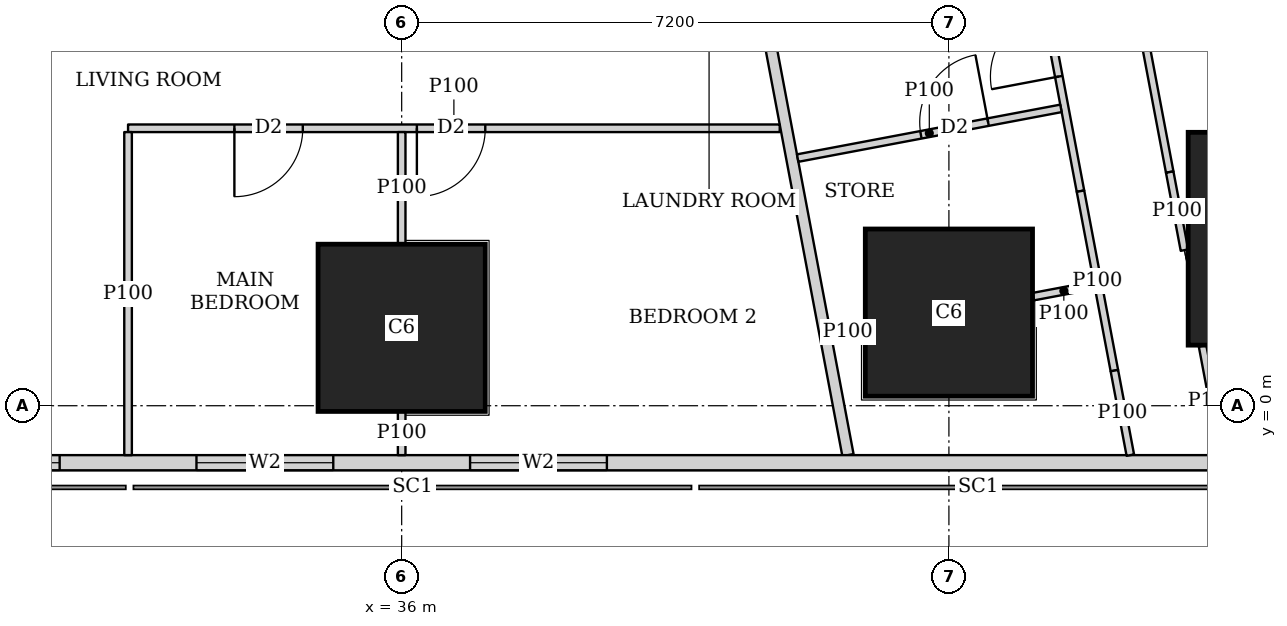
"""IFC4 building model, lengths in metres.
Left out: names, types, materials, properties, quantities, classifications, styles, units other than length and angle.
Written with IfcOpenShell. Run it as: python <this file> out.ifc"""

import sys

from ifc_helpers import new_model, si_unit, direction, frame, frame_2d, origin, origin_2d, place, context, subcontext, project, spatial, rectangle, extrude, element, fill, save


model = new_model("IFC4")
c1 = context("Model", 3, precision=1e-05, world=origin(), true_north=direction((0.0, 1.0)))
c2 = subcontext(c1, "Body", "Model", "MODEL_VIEW")
j1 = project(units=[si_unit("LENGTHUNIT", "METRE"), si_unit("PLANEANGLEUNIT", "RADIAN")], contexts=[c1])
p1 = place(None, origin())
s1 = spatial("IfcSite", under=j1, at=p1, CompositionType="ELEMENT")
p2 = place(p1, origin())
s2 = spatial("IfcBuilding", under=s1, at=p2, CompositionType="ELEMENT")
p3 = place(p2, frame((0.0, 0.0, 111.65)))
s3 = spatial("IfcBuildingStorey", under=s2, at=p3, CompositionType="ELEMENT", Elevation=111.65)
for number, where, z_axis, x_axis in (
    (1, (36.0, 1.025, 0.0), (0.0, 0.0, 1.0), (1.0, 0.0, 0.0)),
    (2, (43.2, 1.225, 0.0), (0.0, 0.0, 1.0), (1.0, 0.0, 0.0)),
):
    element("IfcColumn", number, at=place(p3, frame(where, z_axis=z_axis, x_axis=x_axis)), inside=s3, PredefinedType="COLUMN", context=c2, shape_type="SweptSolid", body=[
        extrude(rectangle(XDim=2.2, YDim=2.2, at=origin_2d()), origin(), (0.0, 0.0, 1.0), 3.75),
    ])
p4 = place(p3, frame((47.748, 2.197, 0.0), z_axis=(0.0, 0.0, 1.0), x_axis=(1.0, 0.0, 0.0)))
e3 = element("IfcColumn", 3, at=p4, inside=s3, PredefinedType="COLUMN", context=c2, shape_type="SweptSolid", body=[
    extrude(rectangle(XDim=2.8, YDim=2.8, at=origin_2d()), origin(), (0.0, 0.0, 1.0), 3.75),
])
p5 = place(p3, frame((2.163, -0.75, 0.0), z_axis=(0.0, 0.0, 1.0), x_axis=(1.0, 0.0, 0.0)))
e4 = element("IfcWall", 4, at=p5, inside=s3, PredefinedType="SOLIDWALL", context=c2, shape_type="SweptSolid", body=[
    extrude(rectangle(XDim=45.628, YDim=0.2, at=frame_2d((22.814, 0.0))), origin(), (0.0, 0.0, 1.0), 3.5),
])
p6 = place(p5, frame((9.537, 0.0, 0.9)))
e5 = element("IfcOpeningElement", 5, at=p6, cuts=e4, PredefinedType="OPENING", context=c2, shape_type="SweptSolid", body=[
    extrude(rectangle(XDim=1.8, YDim=1.5, at=frame_2d((0.9, 0.75))), frame((0.0, 0.11, 0.0), z_axis=(0.0, -1.0, 0.0), x_axis=(1.0, 0.0, 0.0)), (0.0, 0.0, 1.0), 0.22),
])
p7 = place(p5, frame((13.137, 0.0, 0.9)))
e6 = element("IfcOpeningElement", 6, at=p7, cuts=e4, PredefinedType="OPENING", context=c2, shape_type="SweptSolid", body=[
    extrude(rectangle(XDim=1.8, YDim=1.5, at=frame_2d((0.9, 0.75))), frame((0.0, 0.11, 0.0), z_axis=(0.0, -1.0, 0.0), x_axis=(1.0, 0.0, 0.0)), (0.0, 0.0, 1.0), 0.22),
])
p8 = place(p5, frame((16.737, 0.0, 0.9)))
e7 = element("IfcOpeningElement", 7, at=p8, cuts=e4, PredefinedType="OPENING", context=c2, shape_type="SweptSolid", body=[
    extrude(rectangle(XDim=1.8, YDim=1.5, at=frame_2d((0.9, 0.75))), frame((0.0, 0.11, 0.0), z_axis=(0.0, -1.0, 0.0), x_axis=(1.0, 0.0, 0.0)), (0.0, 0.0, 1.0), 0.22),
])
p9 = place(p5, frame((20.337, 0.0, 0.9)))
e8 = element("IfcOpeningElement", 8, at=p9, cuts=e4, PredefinedType="OPENING", context=c2, shape_type="SweptSolid", body=[
    extrude(rectangle(XDim=1.8, YDim=1.5, at=frame_2d((0.9, 0.75))), frame((0.0, 0.11, 0.0), z_axis=(0.0, -1.0, 0.0), x_axis=(1.0, 0.0, 0.0)), (0.0, 0.0, 1.0), 0.22),
])
p10 = place(p5, frame((23.937, 0.0, 0.9)))
e9 = element("IfcOpeningElement", 9, at=p10, cuts=e4, PredefinedType="OPENING", context=c2, shape_type="SweptSolid", body=[
    extrude(rectangle(XDim=1.8, YDim=1.5, at=frame_2d((0.9, 0.75))), frame((0.0, 0.11, 0.0), z_axis=(0.0, -1.0, 0.0), x_axis=(1.0, 0.0, 0.0)), (0.0, 0.0, 1.0), 0.22),
])
p11 = place(p5, frame((27.537, 0.0, 0.9)))
e10 = element("IfcOpeningElement", 10, at=p11, cuts=e4, PredefinedType="OPENING", context=c2, shape_type="SweptSolid", body=[
    extrude(rectangle(XDim=1.8, YDim=1.5, at=frame_2d((0.9, 0.75))), frame((0.0, 0.11, 0.0), z_axis=(0.0, -1.0, 0.0), x_axis=(1.0, 0.0, 0.0)), (0.0, 0.0, 1.0), 0.22),
])
p12 = place(p5, frame((31.137, 0.0, 0.9)))
e11 = element("IfcOpeningElement", 11, at=p12, cuts=e4, PredefinedType="OPENING", context=c2, shape_type="SweptSolid", body=[
    extrude(rectangle(XDim=1.8, YDim=1.5, at=frame_2d((0.9, 0.75))), frame((0.0, 0.11, 0.0), z_axis=(0.0, -1.0, 0.0), x_axis=(1.0, 0.0, 0.0)), (0.0, 0.0, 1.0), 0.22),
])
p13 = place(p5, frame((34.737, 0.0, 0.9)))
e12 = element("IfcOpeningElement", 12, at=p13, cuts=e4, PredefinedType="OPENING", context=c2, shape_type="SweptSolid", body=[
    extrude(rectangle(XDim=1.8, YDim=1.5, at=frame_2d((0.9, 0.75))), frame((0.0, 0.11, 0.0), z_axis=(0.0, -1.0, 0.0), x_axis=(1.0, 0.0, 0.0)), (0.0, 0.0, 1.0), 0.22),
])
p14 = place(p3, frame((50.653, 2.703, 0.0), z_axis=(0.0, 0.0, 1.0), x_axis=(-0.185612026696, 0.982623109613, 0.0)))
e13 = element("IfcWall", 13, at=p14, inside=s3, PredefinedType="SOLIDWALL", context=c2, shape_type="SweptSolid", body=[
    extrude(rectangle(XDim=41.393, YDim=0.2, at=frame_2d((20.697, 0.0))), origin(), (0.0, 0.0, 1.0), 3.5),
])
p15 = place(p14, frame((1.633, 0.0, 0.9)))
e14 = element("IfcOpeningElement", 14, at=p15, cuts=e13, PredefinedType="OPENING", context=c2, shape_type="SweptSolid", body=[
    extrude(rectangle(XDim=1.8, YDim=1.5, at=frame_2d((0.9, 0.75))), frame((0.0, 0.11, 0.0), z_axis=(0.0, -1.0, 0.0), x_axis=(1.0, 0.0, 0.0)), (0.0, 0.0, 1.0), 0.22),
])
p16 = place(p14, frame((6.032, 0.0, 0.9)))
e15 = element("IfcOpeningElement", 15, at=p16, cuts=e13, PredefinedType="OPENING", context=c2, shape_type="SweptSolid", body=[
    extrude(rectangle(XDim=1.8, YDim=1.5, at=frame_2d((0.9, 0.75))), frame((0.0, 0.11, 0.0), z_axis=(0.0, -1.0, 0.0), x_axis=(1.0, 0.0, 0.0)), (0.0, 0.0, 1.0), 0.22),
])
p17 = place(p14, frame((9.848, 0.0, 0.9)))
e16 = element("IfcOpeningElement", 16, at=p17, cuts=e13, PredefinedType="OPENING", context=c2, shape_type="SweptSolid", body=[
    extrude(rectangle(XDim=1.8, YDim=1.5, at=frame_2d((0.9, 0.75))), frame((0.0, 0.11, 0.0), z_axis=(0.0, -1.0, 0.0), x_axis=(1.0, 0.0, 0.0)), (0.0, 0.0, 1.0), 0.22),
])
p18 = place(p14, frame((13.664, 0.0, 0.9)))
e17 = element("IfcOpeningElement", 17, at=p18, cuts=e13, PredefinedType="OPENING", context=c2, shape_type="SweptSolid", body=[
    extrude(rectangle(XDim=1.8, YDim=1.5, at=frame_2d((0.9, 0.75))), frame((0.0, 0.11, 0.0), z_axis=(0.0, -1.0, 0.0), x_axis=(1.0, 0.0, 0.0)), (0.0, 0.0, 1.0), 0.22),
])
p19 = place(p14, frame((17.481, 0.0, 0.9)))
e18 = element("IfcOpeningElement", 18, at=p19, cuts=e13, PredefinedType="OPENING", context=c2, shape_type="SweptSolid", body=[
    extrude(rectangle(XDim=1.8, YDim=1.5, at=frame_2d((0.9, 0.75))), frame((0.0, 0.11, 0.0), z_axis=(0.0, -1.0, 0.0), x_axis=(1.0, 0.0, 0.0)), (0.0, 0.0, 1.0), 0.22),
])
p20 = place(p14, frame((21.297, 0.0, 0.9)))
e19 = element("IfcOpeningElement", 19, at=p20, cuts=e13, PredefinedType="OPENING", context=c2, shape_type="SweptSolid", body=[
    extrude(rectangle(XDim=1.8, YDim=1.5, at=frame_2d((0.9, 0.75))), frame((0.0, 0.11, 0.0), z_axis=(0.0, -1.0, 0.0), x_axis=(1.0, 0.0, 0.0)), (0.0, 0.0, 1.0), 0.22),
])
p21 = place(p14, frame((25.113, 0.0, 0.9)))
e20 = element("IfcOpeningElement", 20, at=p21, cuts=e13, PredefinedType="OPENING", context=c2, shape_type="SweptSolid", body=[
    extrude(rectangle(XDim=1.8, YDim=1.5, at=frame_2d((0.9, 0.75))), frame((0.0, 0.11, 0.0), z_axis=(0.0, -1.0, 0.0), x_axis=(1.0, 0.0, 0.0)), (0.0, 0.0, 1.0), 0.22),
])
p22 = place(p14, frame((28.93, 0.0, 0.9)))
e21 = element("IfcOpeningElement", 21, at=p22, cuts=e13, PredefinedType="OPENING", context=c2, shape_type="SweptSolid", body=[
    extrude(rectangle(XDim=1.8, YDim=1.5, at=frame_2d((0.9, 0.75))), frame((0.0, 0.11, 0.0), z_axis=(0.0, -1.0, 0.0), x_axis=(1.0, 0.0, 0.0)), (0.0, 0.0, 1.0), 0.22),
])
p23 = place(p14, frame((32.746, 0.0, 0.9)))
e22 = element("IfcOpeningElement", 22, at=p23, cuts=e13, PredefinedType="OPENING", context=c2, shape_type="SweptSolid", body=[
    extrude(rectangle(XDim=1.8, YDim=1.5, at=frame_2d((0.9, 0.75))), frame((0.0, 0.11, 0.0), z_axis=(0.0, -1.0, 0.0), x_axis=(1.0, 0.0, 0.0)), (0.0, 0.0, 1.0), 0.22),
])
p24 = place(p14, frame((36.481, 0.0, 0.9)))
e23 = element("IfcOpeningElement", 23, at=p24, cuts=e13, PredefinedType="OPENING", context=c2, shape_type="SweptSolid", body=[
    extrude(rectangle(XDim=1.8, YDim=1.5, at=frame_2d((0.9, 0.75))), frame((0.0, 0.11, 0.0), z_axis=(0.0, -1.0, 0.0), x_axis=(1.0, 0.0, 0.0)), (0.0, 0.0, 1.0), 0.22),
])
p25 = place(p3, frame((33.127, 45.65, 0.0), z_axis=(0.0, 0.0, 1.0), x_axis=(0.185598547723, -0.98262565562, 0.0)))
e24 = element("IfcWall", 24, at=p25, inside=s3, PredefinedType="SOLIDWALL", context=c2, shape_type="SweptSolid", body=[
    extrude(rectangle(XDim=47.118, YDim=0.15, at=frame_2d((23.559, 0.0))), origin(), (0.0, 0.0, 1.0), 2.2),
])
p26 = place(p25, frame((20.373, 0.0, 0.0)))
e25 = element("IfcOpeningElement", 25, at=p26, cuts=e24, PredefinedType="OPENING", context=c2, shape_type="SweptSolid", body=[
    extrude(rectangle(XDim=1.0, YDim=2.1, at=frame_2d((0.5, 1.05))), frame((0.0, 0.085, 0.0), z_axis=(0.0, -1.0, 0.0), x_axis=(1.0, 0.0, 0.0)), (0.0, 0.0, 1.0), 0.17),
])
p27 = place(p25, frame((24.188, 0.0, 0.0)))
e26 = element("IfcOpeningElement", 26, at=p27, cuts=e24, PredefinedType="OPENING", context=c2, shape_type="SweptSolid", body=[
    extrude(rectangle(XDim=1.0, YDim=2.1, at=frame_2d((0.5, 1.05))), frame((0.0, 0.085, 0.0), z_axis=(0.0, -1.0, 0.0), x_axis=(1.0, 0.0, 0.0)), (0.0, 0.0, 1.0), 0.17),
])
p28 = place(p25, frame((32.608, 0.0, 0.0)))
e27 = element("IfcOpeningElement", 27, at=p28, cuts=e24, PredefinedType="OPENING", context=c2, shape_type="SweptSolid", body=[
    extrude(rectangle(XDim=1.0, YDim=2.1, at=frame_2d((0.5, 1.05))), frame((0.0, 0.085, 0.0), z_axis=(0.0, -1.0, 0.0), x_axis=(1.0, 0.0, 0.0)), (0.0, 0.0, 1.0), 0.17),
])
p29 = place(p3, frame((40.974, 3.65, 0.0), z_axis=(0.0, 0.0, 1.0), x_axis=(-1.0, 0.0, 0.0)))
e28 = element("IfcWall", 28, at=p29, inside=s3, PredefinedType="PARTITIONING", context=c2, shape_type="SweptSolid", body=[
    extrude(rectangle(XDim=8.574, YDim=0.1, at=frame_2d((4.287, 0.0))), origin(), (0.0, 0.0, 1.0), 3.5),
])
p30 = place(p29, frame((6.275, 0.0, 0.0)))
e29 = element("IfcOpeningElement", 29, at=p30, cuts=e28, PredefinedType="OPENING", context=c2, shape_type="SweptSolid", body=[
    extrude(rectangle(XDim=0.9, YDim=2.1, at=frame_2d((0.45, 1.05))), frame((0.0, 0.06, 0.0), z_axis=(0.0, -1.0, 0.0), x_axis=(1.0, 0.0, 0.0)), (0.0, 0.0, 1.0), 0.12),
])
p31 = place(p29, frame((3.874, 0.0, 0.0)))
e30 = element("IfcOpeningElement", 30, at=p31, cuts=e28, PredefinedType="OPENING", context=c2, shape_type="SweptSolid", body=[
    extrude(rectangle(XDim=0.9, YDim=2.1, at=frame_2d((0.45, 1.05))), frame((0.0, 0.06, 0.0), z_axis=(0.0, -1.0, 0.0), x_axis=(1.0, 0.0, 0.0)), (0.0, 0.0, 1.0), 0.12),
])
p32 = place(p3, frame((32.4, -0.65, 0.0), z_axis=(0.0, 0.0, 1.0), x_axis=(0.0, 1.0, 0.0)))
e31 = element("IfcWall", 31, at=p32, inside=s3, PredefinedType="PARTITIONING", context=c2, shape_type="SweptSolid", body=[
    extrude(rectangle(XDim=4.25, YDim=0.1, at=frame_2d((2.125, 0.0))), origin(), (0.0, 0.0, 1.0), 2.2),
])
p33 = place(p3, frame((36.0, -0.65, 0.0), z_axis=(0.0, 0.0, 1.0), x_axis=(0.0, 1.0, 0.0)))
e32 = element("IfcWall", 32, at=p33, inside=s3, PredefinedType="PARTITIONING", context=c2, shape_type="SweptSolid", body=[
    extrude(rectangle(XDim=0.574, YDim=0.1, at=frame_2d((0.287, 0.0))), origin(), (0.0, 0.0, 1.0), 3.5),
])
p34 = place(p3, frame((36.0, 2.126, 0.0), z_axis=(0.0, 0.0, 1.0), x_axis=(0.0, 1.0, 0.0)))
e33 = element("IfcWall", 33, at=p34, inside=s3, PredefinedType="PARTITIONING", context=c2, shape_type="SweptSolid", body=[
    extrude(rectangle(XDim=1.474, YDim=0.1, at=frame_2d((0.737, 0.0))), origin(), (0.0, 0.0, 1.0), 3.5),
])
p35 = place(p3, frame((44.08, 13.794, 0.0), z_axis=(0.0, 0.0, 1.0), x_axis=(0.185608455357, -0.982623784212, 0.0)))
e34 = element("IfcWall", 34, at=p35, inside=s3, PredefinedType="PARTITIONING", context=c2, shape_type="SweptSolid", body=[
    extrude(rectangle(XDim=10.909, YDim=0.1, at=frame_2d((5.455, 0.0))), origin(), (0.0, 0.0, 1.0), 3.5),
])
p36 = place(p35, frame((1.094, 0.0, 0.0)))
e35 = element("IfcOpeningElement", 35, at=p36, cuts=e34, PredefinedType="OPENING", context=c2, shape_type="SweptSolid", body=[
    extrude(rectangle(XDim=0.9, YDim=2.1, at=frame_2d((0.45, 1.05))), frame((0.0, 0.06, 0.0), z_axis=(0.0, -1.0, 0.0), x_axis=(1.0, 0.0, 0.0)), (0.0, 0.0, 1.0), 0.12),
])
p37 = place(p35, frame((3.639, 0.0, 0.0)))
e36 = element("IfcOpeningElement", 36, at=p37, cuts=e34, PredefinedType="OPENING", context=c2, shape_type="SweptSolid", body=[
    extrude(rectangle(XDim=0.9, YDim=2.1, at=frame_2d((0.45, 1.05))), frame((0.0, 0.06, 0.0), z_axis=(0.0, -1.0, 0.0), x_axis=(1.0, 0.0, 0.0)), (0.0, 0.0, 1.0), 0.12),
])
p38 = place(p35, frame((8.05, 0.0, 0.0)))
e37 = element("IfcOpeningElement", 37, at=p38, cuts=e34, PredefinedType="OPENING", context=c2, shape_type="SweptSolid", body=[
    extrude(rectangle(XDim=0.9, YDim=2.1, at=frame_2d((0.45, 1.05))), frame((0.0, 0.06, 0.0), z_axis=(0.0, -1.0, 0.0), x_axis=(1.0, 0.0, 0.0)), (0.0, 0.0, 1.0), 0.12),
])
p39 = place(p3, frame((46.105, 3.074, 0.0), z_axis=(0.0, 0.0, 1.0), x_axis=(0.185727077805, -0.982601370124, 0.0)))
e38 = element("IfcWall", 38, at=p39, inside=s3, PredefinedType="PARTITIONING", context=c2, shape_type="SweptSolid", body=[
    extrude(rectangle(XDim=1.045, YDim=0.1, at=frame_2d((0.522, 0.0))), origin(), (0.0, 0.0, 1.0), 2.05),
])
p40 = place(p3, frame((46.537, 0.787, 0.0), z_axis=(0.0, 0.0, 1.0), x_axis=(0.1853166059, -0.982678866964, 0.0)))
e39 = element("IfcWall", 39, at=p40, inside=s3, PredefinedType="PARTITIONING", context=c2, shape_type="SweptSolid", body=[
    extrude(rectangle(XDim=1.462, YDim=0.1, at=frame_2d((0.731, 0.0))), origin(), (0.0, 0.0, 1.0), 2.05),
])
p41 = place(p3, frame((44.049, 7.491, 0.0), z_axis=(0.0, 0.0, 1.0), x_axis=(0.185628828844, -0.982619935632, 0.0)))
e40 = element("IfcWall", 40, at=p41, inside=s3, PredefinedType="PARTITIONING", context=c2, shape_type="SweptSolid", body=[
    extrude(rectangle(XDim=4.75, YDim=0.1, at=frame_2d((2.375, 0.0))), origin(), (0.0, 0.0, 1.0), 3.5),
])
p42 = place(p41, frame((0.8, 0.0, 0.0)))
e41 = element("IfcOpeningElement", 41, at=p42, cuts=e40, PredefinedType="OPENING", context=c2, shape_type="SweptSolid", body=[
    extrude(rectangle(XDim=0.9, YDim=2.1, at=frame_2d((0.45, 1.05))), frame((0.0, 0.06, 0.0), z_axis=(0.0, -1.0, 0.0), x_axis=(1.0, 0.0, 0.0)), (0.0, 0.0, 1.0), 0.12),
])
p43 = place(p41, frame((2.316, 0.0, 0.0)))
e42 = element("IfcOpeningElement", 42, at=p43, cuts=e40, PredefinedType="OPENING", context=c2, shape_type="SweptSolid", body=[
    extrude(rectangle(XDim=0.9, YDim=2.1, at=frame_2d((0.45, 1.05))), frame((0.0, 0.06, 0.0), z_axis=(0.0, -1.0, 0.0), x_axis=(1.0, 0.0, 0.0)), (0.0, 0.0, 1.0), 0.12),
])
p44 = place(p3, frame((44.931, 2.823, 0.0), z_axis=(0.0, 0.0, 1.0), x_axis=(0.185631845838, -0.982619365681, 0.0)))
e43 = element("IfcWall", 43, at=p44, inside=s3, PredefinedType="PARTITIONING", context=c2, shape_type="SweptSolid", body=[
    extrude(rectangle(XDim=2.403, YDim=0.1, at=frame_2d((1.201, 0.0))), origin(), (0.0, 0.0, 1.0), 2.05),
])
p45 = place(p3, frame((45.377, 0.462, 0.0), z_axis=(0.0, 0.0, 1.0), x_axis=(0.185565106588, -0.9826319714, 0.0)))
e44 = element("IfcWall", 44, at=p45, inside=s3, PredefinedType="PARTITIONING", context=c2, shape_type="SweptSolid", body=[
    extrude(rectangle(XDim=1.131, YDim=0.1, at=frame_2d((0.566, 0.0))), origin(), (0.0, 0.0, 1.0), 3.5),
])
p46 = place(p3, frame((45.114, 1.587, 0.0), z_axis=(0.0, 0.0, 1.0), x_axis=(-0.982624706348, -0.185603573443, 0.0)))
e45 = element("IfcWall", 45, at=p46, inside=s3, PredefinedType="PARTITIONING", context=c2, shape_type="SweptSolid", body=[
    extrude(rectangle(XDim=0.818, YDim=0.1, at=frame_2d((0.409, 0.0))), origin(), (0.0, 0.0, 1.0), 2.05),
])
p47 = place(p3, frame((42.09, 1.015, 0.0), z_axis=(0.0, 0.0, 1.0), x_axis=(-0.982680384557, -0.185308558375, 0.0)))
e46 = element("IfcWall", 46, at=p47, inside=s3, PredefinedType="PARTITIONING", context=c2, shape_type="SweptSolid", body=[
    extrude(rectangle(XDim=0.448, YDim=0.1, at=frame_2d((0.224, 0.0))), origin(), (0.0, 0.0, 1.0), 2.05),
])
p48 = place(p3, frame((41.21, 3.258, 0.0), z_axis=(0.0, 0.0, 1.0), x_axis=(0.982638553676, 0.185530247748, 0.0)))
e47 = element("IfcWall", 47, at=p48, inside=s3, PredefinedType="PARTITIONING", context=c2, shape_type="SweptSolid", body=[
    extrude(rectangle(XDim=3.525, YDim=0.1, at=frame_2d((1.763, 0.0))), origin(), (0.0, 0.0, 1.0), 3.5),
])
p49 = place(p48, frame((1.65, 0.0, 0.0)))
e48 = element("IfcOpeningElement", 48, at=p49, cuts=e47, PredefinedType="OPENING", context=c2, shape_type="SweptSolid", body=[
    extrude(rectangle(XDim=0.9, YDim=2.1, at=frame_2d((0.45, 1.05))), frame((0.0, 0.06, 0.0), z_axis=(0.0, -1.0, 0.0), x_axis=(1.0, 0.0, 0.0)), (0.0, 0.0, 1.0), 0.12),
])
p50 = place(p11, origin())
e49 = element("IfcWindow", 49, at=p50, inside=s3, PartitioningType="SINGLE_PANEL", PredefinedType="WINDOW", context=c2, shape_type="SweptSolid", body=[
    extrude(rectangle(XDim=1.8, YDim=1.5, at=frame_2d((0.9, 0.75))), frame((0.0, 0.03, 0.0), z_axis=(0.0, -1.0, 0.0), x_axis=(1.0, 0.0, 0.0)), (0.0, 0.0, 1.0), 0.06),
])
fill(e10, e49)
p51 = place(p12, origin())
e50 = element("IfcWindow", 50, at=p51, inside=s3, PartitioningType="SINGLE_PANEL", PredefinedType="WINDOW", context=c2, shape_type="SweptSolid", body=[
    extrude(rectangle(XDim=1.8, YDim=1.5, at=frame_2d((0.9, 0.75))), frame((0.0, 0.03, 0.0), z_axis=(0.0, -1.0, 0.0), x_axis=(1.0, 0.0, 0.0)), (0.0, 0.0, 1.0), 0.06),
])
fill(e11, e50)
p52 = place(p13, origin())
e51 = element("IfcWindow", 51, at=p52, inside=s3, PartitioningType="SINGLE_PANEL", PredefinedType="WINDOW", context=c2, shape_type="SweptSolid", body=[
    extrude(rectangle(XDim=1.8, YDim=1.5, at=frame_2d((0.9, 0.75))), frame((0.0, 0.03, 0.0), z_axis=(0.0, -1.0, 0.0), x_axis=(1.0, 0.0, 0.0)), (0.0, 0.0, 1.0), 0.06),
])
fill(e12, e51)
p53 = place(p30, origin())
e52 = element("IfcDoor", 52, at=p53, inside=s3, OperationType="SINGLE_SWING_RIGHT", PredefinedType="DOOR", context=c2, shape_type="SweptSolid", body=[
    extrude(rectangle(XDim=0.9, YDim=2.1, at=frame_2d((0.45, 1.05))), frame((0.0, 0.025, 0.0), z_axis=(0.0, -1.0, 0.0), x_axis=(1.0, 0.0, 0.0)), (0.0, 0.0, 1.0), 0.05),
])
fill(e29, e52)
p54 = place(p31, origin())
e53 = element("IfcDoor", 53, at=p54, inside=s3, OperationType="SINGLE_SWING_RIGHT", PredefinedType="DOOR", context=c2, shape_type="SweptSolid", body=[
    extrude(rectangle(XDim=0.9, YDim=2.1, at=frame_2d((0.45, 1.05))), frame((0.0, 0.025, 0.0), z_axis=(0.0, -1.0, 0.0), x_axis=(1.0, 0.0, 0.0)), (0.0, 0.0, 1.0), 0.05),
])
fill(e30, e53)
p55 = place(p43, origin())
e54 = element("IfcDoor", 54, at=p55, inside=s3, OperationType="SINGLE_SWING_LEFT", PredefinedType="DOOR", context=c2, shape_type="SweptSolid", body=[
    extrude(rectangle(XDim=0.9, YDim=2.1, at=frame_2d((0.45, 1.05))), frame((0.0, 0.025, 0.0), z_axis=(0.0, -1.0, 0.0), x_axis=(1.0, 0.0, 0.0)), (0.0, 0.0, 1.0), 0.05),
])
fill(e42, e54)
p56 = place(p49, origin())
e55 = element("IfcDoor", 55, at=p56, inside=s3, OperationType="SINGLE_SWING_RIGHT", PredefinedType="DOOR", context=c2, shape_type="SweptSolid", body=[
    extrude(rectangle(XDim=0.9, YDim=2.1, at=frame_2d((0.45, 1.05))), frame((0.0, 0.025, 0.0), z_axis=(0.0, -1.0, 0.0), x_axis=(1.0, 0.0, 0.0)), (0.0, 0.0, 1.0), 0.05),
])
fill(e48, e55)
save(model, sys.argv[1])
